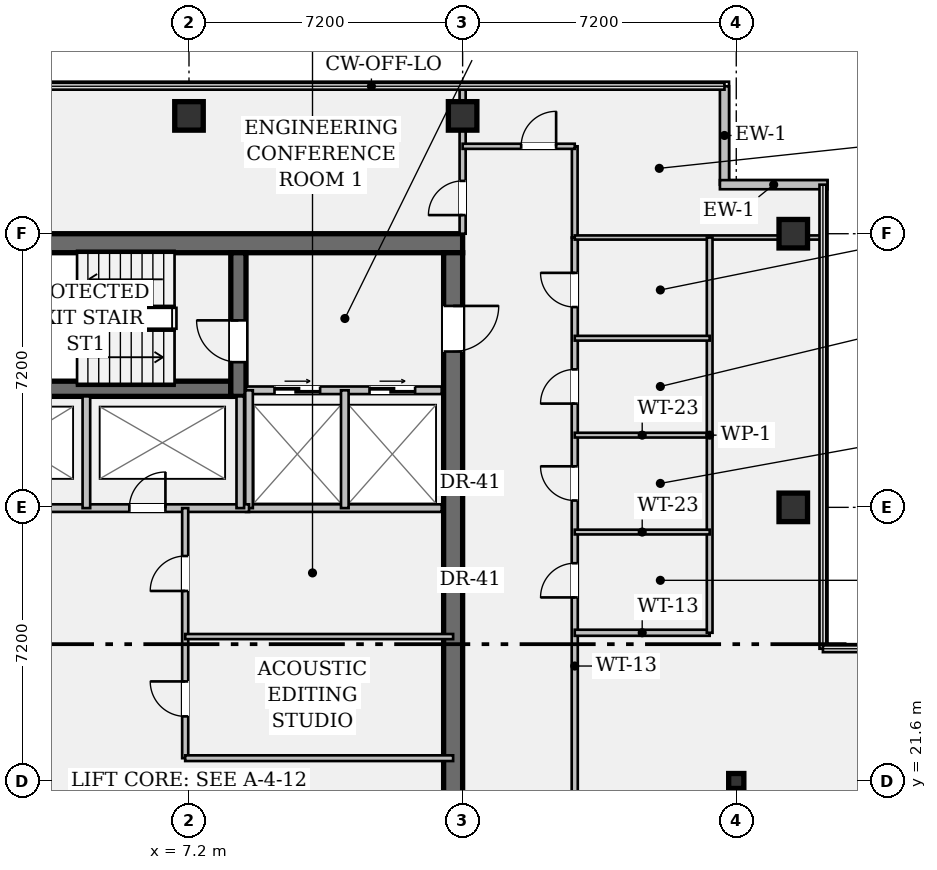
"""IFC4 building model, lengths in metres.
Left out: names, types, materials, properties, quantities, classifications, styles, units other than length and angle.
Written with IfcOpenShell. Run it as: python <this file> out.ifc"""

import sys

from ifc_helpers import new_model, si_unit, direction, frame, frame_2d, origin, origin_2d, place, context, subcontext, project, spatial, rectangle, hollow_rectangle, i_section, extrude, element, fill, save


model = new_model("IFC4")
c1 = context("Model", 3, precision=1e-05, world=origin(), true_north=direction((0.0, 1.0)))
c2 = subcontext(c1, "Body", "Model", "MODEL_VIEW")
j1 = project(units=[si_unit("LENGTHUNIT", "METRE"), si_unit("PLANEANGLEUNIT", "RADIAN")], contexts=[c1])
p1 = place(None, origin())
s1 = spatial("IfcSite", under=j1, at=p1, CompositionType="ELEMENT")
p2 = place(p1, origin())
s2 = spatial("IfcBuilding", under=s1, at=p2, CompositionType="ELEMENT")
p3 = place(p2, frame((0.0, 0.0, 201.25)))
s3 = spatial("IfcBuildingStorey", under=s2, at=p3, CompositionType="ELEMENT", Elevation=201.25)
p4 = place(p3, frame((0.5, 35.75, 0.0), z_axis=(0.0, 0.0, 1.0), x_axis=(1.0, 0.0, 0.0)))
e1 = element("IfcWall", 1, at=p4, inside=s3, PredefinedType="SHEAR", context=c2, shape_type="SweptSolid", body=[
    extrude(rectangle(XDim=13.9, YDim=0.5, at=frame_2d((6.95, 0.0))), origin(), (0.0, 0.0, 1.0), 3.24),
])
p5 = place(p3, frame((14.15, 35.5, 0.0), z_axis=(0.0, 0.0, 1.0), x_axis=(0.0, -1.0, 0.0)))
e2 = element("IfcWall", 2, at=p5, inside=s3, PredefinedType="SHEAR", context=c2, shape_type="SweptSolid", body=[
    extrude(rectangle(XDim=27.8, YDim=0.5, at=frame_2d((13.9, 0.0))), origin(), (0.0, 0.0, 1.0), 3.24),
])
p6 = place(p5, frame((1.4, 0.0, 0.0)))
e3 = element("IfcOpeningElement", 3, at=p6, cuts=e2, PredefinedType="OPENING", context=c2, shape_type="SweptSolid", body=[
    extrude(rectangle(XDim=1.2, YDim=2.15, at=frame_2d((0.6, 1.075))), frame((0.0, 0.262, 0.0), z_axis=(0.0, -1.0, 0.0), x_axis=(1.0, 0.0, 0.0)), (0.0, 0.0, 1.0), 0.524),
])
p7 = place(p5, frame((25.35, 0.0, 0.0)))
e4 = element("IfcOpeningElement", 4, at=p7, cuts=e2, PredefinedType="OPENING", context=c2, shape_type="SweptSolid", body=[
    extrude(rectangle(XDim=1.2, YDim=2.15, at=frame_2d((0.6, 1.075))), frame((0.0, 0.262, 0.0), z_axis=(0.0, -1.0, 0.0), x_axis=(1.0, 0.0, 0.0)), (0.0, 0.0, 1.0), 0.524),
])
p8 = place(p5, frame((14.7, 0.0, 0.0)))
e5 = element("IfcOpeningElement", 5, at=p8, cuts=e2, PredefinedType="OPENING", context=c2, shape_type="SweptSolid", body=[
    extrude(rectangle(XDim=1.6, YDim=2.2, at=frame_2d((0.8, 1.1))), frame((0.0, 0.262, 0.0), z_axis=(0.0, -1.0, 0.0), x_axis=(1.0, 0.0, 0.0)), (0.0, 0.0, 1.0), 0.524),
])
p9 = place(p3, frame((0.5, 31.92, 0.0), z_axis=(0.0, 0.0, 1.0), x_axis=(1.0, 0.0, 0.0)))
e6 = element("IfcWall", 6, at=p9, inside=s3, PredefinedType="SHEAR", context=c2, shape_type="SweptSolid", body=[
    extrude(rectangle(XDim=7.8, YDim=0.4, at=frame_2d((3.9, 0.0))), origin(), (0.0, 0.0, 1.0), 3.24),
])
p10 = place(p3, frame((8.5, 31.72, 0.0), z_axis=(0.0, 0.0, 1.0), x_axis=(0.0, 1.0, 0.0)))
e7 = element("IfcWall", 7, at=p10, inside=s3, PredefinedType="SHEAR", context=c2, shape_type="SweptSolid", body=[
    extrude(rectangle(XDim=3.78, YDim=0.4, at=frame_2d((1.89, 0.0))), origin(), (0.0, 0.0, 1.0), 3.24),
])
p11 = place(p10, frame((0.9, 0.0, 0.0)))
e8 = element("IfcOpeningElement", 8, at=p11, cuts=e7, PredefinedType="OPENING", context=c2, shape_type="SweptSolid", body=[
    extrude(rectangle(XDim=1.1, YDim=2.15, at=frame_2d((0.55, 1.075))), frame((0.0, 0.212, 0.0), z_axis=(0.0, -1.0, 0.0), x_axis=(1.0, 0.0, 0.0)), (0.0, 0.0, 1.0), 0.424),
])
for number, where, z_axis, x_axis in (
    (9, (7.2, 39.1, 0.0), (0.0, 0.0, 1.0), (1.0, 0.0, 0.0)),
    (10, (14.4, 39.1, 0.0), (0.0, 0.0, 1.0), (1.0, 0.0, 0.0)),
):
    element("IfcColumn", number, at=place(p3, frame(where, z_axis=z_axis, x_axis=x_axis)), inside=s3, PredefinedType="COLUMN", context=c2, shape_type="SweptSolid", body=[
        extrude(hollow_rectangle(XDim=0.75, YDim=0.75, WallThickness=0.045, at=origin_2d()), origin(), (0.0, 0.0, 1.0), 3.24),
    ])
p12 = place(p3, frame((21.6, 21.6, 0.0), z_axis=(0.0, 0.0, 1.0), x_axis=(1.0, 0.0, 0.0)))
e11 = element("IfcColumn", 11, at=p12, inside=s3, PredefinedType="COLUMN", context=c2, shape_type="SweptSolid", body=[
    extrude(i_section(OverallWidth=0.399, OverallDepth=0.394, WebThickness=0.023, FlangeThickness=0.037, FilletRadius=0.018, at=origin_2d()), origin(), (0.0, 0.0, 1.0), 3.24),
])
for number, where, z_axis, x_axis in (
    (12, (23.1, 28.8, 0.0), (0.0, 0.0, 1.0), (1.0, 0.0, 0.0)),
    (13, (23.1, 36.0, 0.0), (0.0, 0.0, 1.0), (1.0, 0.0, 0.0)),
):
    element("IfcColumn", number, at=place(p3, frame(where, z_axis=z_axis, x_axis=x_axis)), inside=s3, PredefinedType="COLUMN", context=c2, shape_type="SweptSolid", body=[
        extrude(hollow_rectangle(XDim=0.75, YDim=0.75, WallThickness=0.045, at=origin_2d()), origin(), (0.0, 0.0, 1.0), 3.24),
    ])
p13 = place(p3, frame((21.29, 39.88, 0.0), z_axis=(0.0, 0.0, 1.0), x_axis=(0.0, -1.0, 0.0)))
e14 = element("IfcWall", 14, at=p13, inside=s3, PredefinedType="STANDARD", context=c2, shape_type="SweptSolid", body=[
    extrude(rectangle(XDim=2.59, YDim=0.24, at=frame_2d((1.295, 0.0))), origin(), (0.0, 0.0, 1.0), 3.24),
])
p14 = place(p3, frame((21.17, 37.29, 0.0), z_axis=(0.0, 0.0, 1.0), x_axis=(1.0, 0.0, 0.0)))
e15 = element("IfcWall", 15, at=p14, inside=s3, PredefinedType="STANDARD", context=c2, shape_type="SweptSolid", body=[
    extrude(rectangle(XDim=2.83, YDim=0.24, at=frame_2d((1.415, 0.0))), origin(), (0.0, 0.0, 1.0), 3.24),
])
p15 = place(p3, frame((8.7, 31.88, 0.0), z_axis=(0.0, 0.0, 1.0), x_axis=(1.0, 0.0, 0.0)))
e16 = element("IfcWall", 16, at=p15, inside=s3, PredefinedType="PARTITIONING", context=c2, shape_type="SweptSolid", body=[
    extrude(rectangle(XDim=5.15, YDim=0.2, at=frame_2d((2.575, 0.0))), origin(), (0.0, 0.0, 1.0), 3.24),
])
p16 = place(p15, frame((0.75, 0.0, 0.0)))
e17 = element("IfcOpeningElement", 17, at=p16, cuts=e16, PredefinedType="OPENING", context=c2, shape_type="SweptSolid", body=[
    extrude(rectangle(XDim=1.2, YDim=2.2, at=frame_2d((0.6, 1.1))), frame((0.0, 0.112, 0.0), z_axis=(0.0, -1.0, 0.0), x_axis=(1.0, 0.0, 0.0)), (0.0, 0.0, 1.0), 0.224),
])
p17 = place(p15, frame((3.25, 0.0, 0.0)))
e18 = element("IfcOpeningElement", 18, at=p17, cuts=e16, PredefinedType="OPENING", context=c2, shape_type="SweptSolid", body=[
    extrude(rectangle(XDim=1.2, YDim=2.2, at=frame_2d((0.6, 1.1))), frame((0.0, 0.112, 0.0), z_axis=(0.0, -1.0, 0.0), x_axis=(1.0, 0.0, 0.0)), (0.0, 0.0, 1.0), 0.224),
])
p18 = place(p3, frame((8.7, 28.78, 0.0), z_axis=(0.0, 0.0, 1.0), x_axis=(1.0, 0.0, 0.0)))
e19 = element("IfcWall", 19, at=p18, inside=s3, PredefinedType="PARTITIONING", context=c2, shape_type="SweptSolid", body=[
    extrude(rectangle(XDim=5.15, YDim=0.2, at=frame_2d((2.575, 0.0))), origin(), (0.0, 0.0, 1.0), 3.24),
])
for number, where, z_axis, x_axis in (
    (20, (8.78, 28.78, 0.0), (0.0, 0.0, 1.0), (0.0, 1.0, 0.0)),
    (21, (11.3, 28.78, 0.0), (0.0, 0.0, 1.0), (0.0, 1.0, 0.0)),
):
    element("IfcWall", number, at=place(p3, frame(where, z_axis=z_axis, x_axis=x_axis)), inside=s3, PredefinedType="PARTITIONING", context=c2, shape_type="SweptSolid", body=[
        extrude(rectangle(XDim=3.1, YDim=0.2, at=frame_2d((1.55, 0.0))), origin(), (0.0, 0.0, 1.0), 3.24),
    ])
p19 = place(p3, frame((0.6, 28.78, 0.0), z_axis=(0.0, 0.0, 1.0), x_axis=(1.0, 0.0, 0.0)))
e22 = element("IfcWall", 22, at=p19, inside=s3, PredefinedType="PARTITIONING", context=c2, shape_type="SweptSolid", body=[
    extrude(rectangle(XDim=8.18, YDim=0.2, at=frame_2d((4.09, 0.0))), origin(), (0.0, 0.0, 1.0), 3.24),
])
p20 = place(p19, frame((1.21, 0.0, 0.0)))
e23 = element("IfcOpeningElement", 23, at=p20, cuts=e22, PredefinedType="OPENING", context=c2, shape_type="SweptSolid", body=[
    extrude(rectangle(XDim=0.95, YDim=2.15, at=frame_2d((0.475, 1.075))), frame((0.0, 0.112, 0.0), z_axis=(0.0, -1.0, 0.0), x_axis=(1.0, 0.0, 0.0)), (0.0, 0.0, 1.0), 0.224),
])
p21 = place(p19, frame((5.03, 0.0, 0.0)))
e24 = element("IfcOpeningElement", 24, at=p21, cuts=e22, PredefinedType="OPENING", context=c2, shape_type="SweptSolid", body=[
    extrude(rectangle(XDim=0.95, YDim=2.15, at=frame_2d((0.475, 1.075))), frame((0.0, 0.112, 0.0), z_axis=(0.0, -1.0, 0.0), x_axis=(1.0, 0.0, 0.0)), (0.0, 0.0, 1.0), 0.224),
])
for number, where, z_axis, x_axis in (
    (25, (4.5, 28.78, 0.0), (0.0, 0.0, 1.0), (0.0, 1.0, 0.0)),
    (26, (8.55, 28.78, 0.0), (0.0, 0.0, 1.0), (0.0, 1.0, 0.0)),
):
    element("IfcWall", number, at=place(p3, frame(where, z_axis=z_axis, x_axis=x_axis)), inside=s3, PredefinedType="PARTITIONING", context=c2, shape_type="SweptSolid", body=[
        extrude(rectangle(XDim=2.94, YDim=0.2, at=frame_2d((1.47, 0.0))), origin(), (0.0, 0.0, 1.0), 3.24),
    ])
p22 = place(p3, frame((7.1, 22.2, 0.0), z_axis=(0.0, 0.0, 1.0), x_axis=(0.0, 1.0, 0.0)))
e27 = element("IfcWall", 27, at=p22, inside=s3, PredefinedType="PARTITIONING", context=c2, shape_type="SweptSolid", body=[
    extrude(rectangle(XDim=6.58, YDim=0.16, at=frame_2d((3.29, 0.0))), origin(), (0.0, 0.0, 1.0), 3.24),
])
p23 = place(p22, frame((1.1, 0.0, 0.0)))
e28 = element("IfcOpeningElement", 28, at=p23, cuts=e27, PredefinedType="OPENING", context=c2, shape_type="SweptSolid", body=[
    extrude(rectangle(XDim=0.92, YDim=2.15, at=frame_2d((0.46, 1.075))), frame((0.0, 0.092, 0.0), z_axis=(0.0, -1.0, 0.0), x_axis=(1.0, 0.0, 0.0)), (0.0, 0.0, 1.0), 0.184),
])
p24 = place(p22, frame((4.4, 0.0, 0.0)))
e29 = element("IfcOpeningElement", 29, at=p24, cuts=e27, PredefinedType="OPENING", context=c2, shape_type="SweptSolid", body=[
    extrude(rectangle(XDim=0.92, YDim=2.15, at=frame_2d((0.46, 1.075))), frame((0.0, 0.092, 0.0), z_axis=(0.0, -1.0, 0.0), x_axis=(1.0, 0.0, 0.0)), (0.0, 0.0, 1.0), 0.184),
])
p25 = place(p3, frame((7.1, 22.2, 0.0), z_axis=(0.0, 0.0, 1.0), x_axis=(1.0, 0.0, 0.0)))
e30 = element("IfcWall", 30, at=p25, inside=s3, PredefinedType="PARTITIONING", context=c2, shape_type="SweptSolid", body=[
    extrude(rectangle(XDim=7.05, YDim=0.15, at=frame_2d((3.525, 0.0))), origin(), (0.0, 0.0, 1.0), 3.24),
])
p26 = place(p3, frame((7.1, 25.4, 0.0), z_axis=(0.0, 0.0, 1.0), x_axis=(1.0, 0.0, 0.0)))
e31 = element("IfcWall", 31, at=p26, inside=s3, PredefinedType="PARTITIONING", context=c2, shape_type="SweptSolid", body=[
    extrude(rectangle(XDim=7.05, YDim=0.135, at=frame_2d((3.525, 0.0))), origin(), (0.0, 0.0, 1.0), 3.24),
])
p27 = place(p3, frame((17.35, 13.35, 0.0), z_axis=(0.0, 0.0, 1.0), x_axis=(0.0, 1.0, 0.0)))
e32 = element("IfcWall", 32, at=p27, inside=s3, PredefinedType="PARTITIONING", context=c2, shape_type="SweptSolid", body=[
    extrude(rectangle(XDim=22.55, YDim=0.16, at=frame_2d((11.275, 0.0))), origin(), (0.0, 0.0, 1.0), 2.613),
])
p28 = place(p27, frame((13.08, 0.0, 0.0)))
e33 = element("IfcOpeningElement", 33, at=p28, cuts=e32, PredefinedType="OPENING", context=c2, shape_type="SweptSolid", body=[
    extrude(rectangle(XDim=0.9, YDim=2.15, at=frame_2d((0.45, 1.075))), frame((0.0, 0.092, 0.0), z_axis=(0.0, -1.0, 0.0), x_axis=(1.0, 0.0, 0.0)), (0.0, 0.0, 1.0), 0.184),
])
p29 = place(p27, frame((15.63, 0.0, 0.0)))
e34 = element("IfcOpeningElement", 34, at=p29, cuts=e32, PredefinedType="OPENING", context=c2, shape_type="SweptSolid", body=[
    extrude(rectangle(XDim=0.9, YDim=2.15, at=frame_2d((0.45, 1.075))), frame((0.0, 0.092, 0.0), z_axis=(0.0, -1.0, 0.0), x_axis=(1.0, 0.0, 0.0)), (0.0, 0.0, 1.0), 0.184),
])
p30 = place(p27, frame((18.18, 0.0, 0.0)))
e35 = element("IfcOpeningElement", 35, at=p30, cuts=e32, PredefinedType="OPENING", context=c2, shape_type="SweptSolid", body=[
    extrude(rectangle(XDim=0.9, YDim=2.15, at=frame_2d((0.45, 1.075))), frame((0.0, 0.092, 0.0), z_axis=(0.0, -1.0, 0.0), x_axis=(1.0, 0.0, 0.0)), (0.0, 0.0, 1.0), 0.184),
])
p31 = place(p27, frame((20.72, 0.0, 0.0)))
e36 = element("IfcOpeningElement", 36, at=p31, cuts=e32, PredefinedType="OPENING", context=c2, shape_type="SweptSolid", body=[
    extrude(rectangle(XDim=0.9, YDim=2.15, at=frame_2d((0.45, 1.075))), frame((0.0, 0.092, 0.0), z_axis=(0.0, -1.0, 0.0), x_axis=(1.0, 0.0, 0.0)), (0.0, 0.0, 1.0), 0.184),
])
p32 = place(p3, frame((14.4, 36.0, 0.0), z_axis=(0.0, 0.0, 1.0), x_axis=(0.0, 1.0, 0.0)))
e37 = element("IfcWall", 37, at=p32, inside=s3, PredefinedType="PARTITIONING", context=c2, shape_type="SweptSolid", body=[
    extrude(rectangle(XDim=3.88, YDim=0.16, at=frame_2d((1.94, 0.0))), origin(), (0.0, 0.0, 1.0), 2.613),
])
p33 = place(p32, frame((0.49, 0.0, 0.0)))
e38 = element("IfcOpeningElement", 38, at=p33, cuts=e37, PredefinedType="OPENING", context=c2, shape_type="SweptSolid", body=[
    extrude(rectangle(XDim=0.9, YDim=2.15, at=frame_2d((0.45, 1.075))), frame((0.0, 0.092, 0.0), z_axis=(0.0, -1.0, 0.0), x_axis=(1.0, 0.0, 0.0)), (0.0, 0.0, 1.0), 0.184),
])
p34 = place(p3, frame((17.35, 35.9, 0.0), z_axis=(0.0, 0.0, 1.0), x_axis=(0.0, 1.0, 0.0)))
e39 = element("IfcWall", 39, at=p34, inside=s3, PredefinedType="PARTITIONING", context=c2, shape_type="SweptSolid", body=[
    extrude(rectangle(XDim=2.4, YDim=0.15, at=frame_2d((1.2, 0.0))), origin(), (0.0, 0.0, 1.0), 2.613),
])
p35 = place(p3, frame((14.4, 38.3, 0.0), z_axis=(0.0, 0.0, 1.0), x_axis=(1.0, 0.0, 0.0)))
e40 = element("IfcWall", 40, at=p35, inside=s3, PredefinedType="PARTITIONING", context=c2, shape_type="SweptSolid", body=[
    extrude(rectangle(XDim=2.95, YDim=0.135, at=frame_2d((1.475, 0.0))), origin(), (0.0, 0.0, 1.0), 3.24),
])
p36 = place(p35, frame((1.54, 0.0, 0.0)))
e41 = element("IfcOpeningElement", 41, at=p36, cuts=e40, PredefinedType="OPENING", context=c2, shape_type="SweptSolid", body=[
    extrude(rectangle(XDim=0.92, YDim=2.15, at=frame_2d((0.46, 1.075))), frame((0.0, 0.08, 0.0), z_axis=(0.0, -1.0, 0.0), x_axis=(1.0, 0.0, 0.0)), (0.0, 0.0, 1.0), 0.159),
])
p37 = place(p3, frame((17.35, 35.9, 0.0), z_axis=(0.0, 0.0, 1.0), x_axis=(1.0, 0.0, 0.0)))
e42 = element("IfcWall", 42, at=p37, inside=s3, PredefinedType="PARTITIONING", context=c2, shape_type="SweptSolid", body=[
    extrude(rectangle(XDim=6.53, YDim=0.11, at=frame_2d((3.265, 0.0))), origin(), (0.0, 0.0, 1.0), 2.613),
])
p38 = place(p3, frame((17.35, 25.5, 0.0), z_axis=(0.0, 0.0, 1.0), x_axis=(1.0, 0.0, 0.0)))
e43 = element("IfcWall", 43, at=p38, inside=s3, PredefinedType="PARTITIONING", context=c2, shape_type="SweptSolid", body=[
    extrude(rectangle(XDim=3.55, YDim=0.16, at=frame_2d((1.775, 0.0))), origin(), (0.0, 0.0, 1.0), 2.808),
])
p39 = place(p3, frame((20.9, 25.5, 0.0), z_axis=(0.0, 0.0, 1.0), x_axis=(0.0, 1.0, 0.0)))
e44 = element("IfcWall", 44, at=p39, inside=s3, PredefinedType="PARTITIONING", context=c2, shape_type="SweptSolid", body=[
    extrude(rectangle(XDim=10.4, YDim=0.15, at=frame_2d((5.2, 0.0))), origin(), (0.0, 0.0, 1.0), 2.613),
])
for number, where, z_axis, x_axis in (
    (45, (17.35, 28.15, 0.0), (0.0, 0.0, 1.0), (1.0, 0.0, 0.0)),
    (46, (17.35, 30.7, 0.0), (0.0, 0.0, 1.0), (1.0, 0.0, 0.0)),
    (47, (17.35, 33.25, 0.0), (0.0, 0.0, 1.0), (1.0, 0.0, 0.0)),
):
    element("IfcWall", number, at=place(p3, frame(where, z_axis=z_axis, x_axis=x_axis)), inside=s3, PredefinedType="PARTITIONING", context=c2, shape_type="SweptSolid", body=[
        extrude(rectangle(XDim=3.55, YDim=0.125, at=frame_2d((1.775, 0.0))), origin(), (0.0, 0.0, 1.0), 2.808),
    ])
p40 = place(p11, origin())
e48 = element("IfcDoor", 48, at=p40, inside=s3, OperationType="SINGLE_SWING_RIGHT", PredefinedType="DOOR", context=c2, shape_type="SweptSolid", body=[
    extrude(rectangle(XDim=1.1, YDim=2.15, at=frame_2d((0.55, 1.075))), frame((0.0, 0.025, 0.0), z_axis=(0.0, -1.0, 0.0), x_axis=(1.0, 0.0, 0.0)), (0.0, 0.0, 1.0), 0.05),
])
fill(e8, e48)
p41 = place(p6, origin())
e49 = element("IfcDoor", 49, at=p41, inside=s3, OperationType="SINGLE_SWING_LEFT", PredefinedType="DOOR", context=c2, shape_type="SweptSolid", body=[
    extrude(rectangle(XDim=1.2, YDim=2.15, at=frame_2d((0.6, 1.075))), frame((0.0, 0.025, 0.0), z_axis=(0.0, -1.0, 0.0), x_axis=(1.0, 0.0, 0.0)), (0.0, 0.0, 1.0), 0.05),
])
fill(e3, e49)
p42 = place(p16, origin())
e50 = element("IfcDoor", 50, at=p42, inside=s3, OperationType="DOUBLE_DOOR_SLIDING", PredefinedType="DOOR", context=c2, shape_type="SweptSolid", body=[
    extrude(rectangle(XDim=1.2, YDim=2.2, at=frame_2d((0.6, 1.1))), frame((0.0, 0.025, 0.0), z_axis=(0.0, -1.0, 0.0), x_axis=(1.0, 0.0, 0.0)), (0.0, 0.0, 1.0), 0.05),
])
fill(e17, e50)
p43 = place(p17, origin())
e51 = element("IfcDoor", 51, at=p43, inside=s3, OperationType="DOUBLE_DOOR_SLIDING", PredefinedType="DOOR", context=c2, shape_type="SweptSolid", body=[
    extrude(rectangle(XDim=1.2, YDim=2.2, at=frame_2d((0.6, 1.1))), frame((0.0, 0.025, 0.0), z_axis=(0.0, -1.0, 0.0), x_axis=(1.0, 0.0, 0.0)), (0.0, 0.0, 1.0), 0.05),
])
fill(e18, e51)
p44 = place(p21, origin())
e52 = element("IfcDoor", 52, at=p44, inside=s3, OperationType="SINGLE_SWING_RIGHT", PredefinedType="DOOR", context=c2, shape_type="SweptSolid", body=[
    extrude(rectangle(XDim=0.95, YDim=2.15, at=frame_2d((0.475, 1.075))), frame((0.0, 0.025, 0.0), z_axis=(0.0, -1.0, 0.0), x_axis=(1.0, 0.0, 0.0)), (0.0, 0.0, 1.0), 0.05),
])
fill(e24, e52)
p45 = place(p23, origin())
e53 = element("IfcDoor", 53, at=p45, inside=s3, OperationType="SINGLE_SWING_RIGHT", PredefinedType="DOOR", context=c2, shape_type="SweptSolid", body=[
    extrude(rectangle(XDim=0.92, YDim=2.15, at=frame_2d((0.46, 1.075))), frame((0.0, 0.025, 0.0), z_axis=(0.0, -1.0, 0.0), x_axis=(1.0, 0.0, 0.0)), (0.0, 0.0, 1.0), 0.05),
])
fill(e28, e53)
p46 = place(p24, origin())
e54 = element("IfcDoor", 54, at=p46, inside=s3, OperationType="SINGLE_SWING_LEFT", PredefinedType="DOOR", context=c2, shape_type="SweptSolid", body=[
    extrude(rectangle(XDim=0.92, YDim=2.15, at=frame_2d((0.46, 1.075))), frame((0.0, 0.025, 0.0), z_axis=(0.0, -1.0, 0.0), x_axis=(1.0, 0.0, 0.0)), (0.0, 0.0, 1.0), 0.05),
])
fill(e29, e54)
p47 = place(p33, origin())
e55 = element("IfcDoor", 55, at=p47, inside=s3, OperationType="SINGLE_SWING_LEFT", PredefinedType="DOOR", context=c2, shape_type="SweptSolid", body=[
    extrude(rectangle(XDim=0.9, YDim=2.15, at=frame_2d((0.45, 1.075))), frame((0.0, 0.025, 0.0), z_axis=(0.0, -1.0, 0.0), x_axis=(1.0, 0.0, 0.0)), (0.0, 0.0, 1.0), 0.05),
])
fill(e38, e55)
p48 = place(p36, origin())
e56 = element("IfcDoor", 56, at=p48, inside=s3, OperationType="SINGLE_SWING_RIGHT", PredefinedType="DOOR", context=c2, shape_type="SweptSolid", body=[
    extrude(rectangle(XDim=0.92, YDim=2.15, at=frame_2d((0.46, 1.075))), frame((0.0, 0.025, 0.0), z_axis=(0.0, -1.0, 0.0), x_axis=(1.0, 0.0, 0.0)), (0.0, 0.0, 1.0), 0.05),
])
fill(e41, e56)
p49 = place(p28, origin())
e57 = element("IfcDoor", 57, at=p49, inside=s3, OperationType="SINGLE_SWING_LEFT", PredefinedType="DOOR", context=c2, shape_type="SweptSolid", body=[
    extrude(rectangle(XDim=0.9, YDim=2.15, at=frame_2d((0.45, 1.075))), frame((0.0, 0.025, 0.0), z_axis=(0.0, -1.0, 0.0), x_axis=(1.0, 0.0, 0.0)), (0.0, 0.0, 1.0), 0.05),
])
fill(e33, e57)
p50 = place(p29, origin())
e58 = element("IfcDoor", 58, at=p50, inside=s3, OperationType="SINGLE_SWING_RIGHT", PredefinedType="DOOR", context=c2, shape_type="SweptSolid", body=[
    extrude(rectangle(XDim=0.9, YDim=2.15, at=frame_2d((0.45, 1.075))), frame((0.0, 0.025, 0.0), z_axis=(0.0, -1.0, 0.0), x_axis=(1.0, 0.0, 0.0)), (0.0, 0.0, 1.0), 0.05),
])
fill(e34, e58)
p51 = place(p30, origin())
e59 = element("IfcDoor", 59, at=p51, inside=s3, OperationType="SINGLE_SWING_LEFT", PredefinedType="DOOR", context=c2, shape_type="SweptSolid", body=[
    extrude(rectangle(XDim=0.9, YDim=2.15, at=frame_2d((0.45, 1.075))), frame((0.0, 0.025, 0.0), z_axis=(0.0, -1.0, 0.0), x_axis=(1.0, 0.0, 0.0)), (0.0, 0.0, 1.0), 0.05),
])
fill(e35, e59)
p52 = place(p31, origin())
e60 = element("IfcDoor", 60, at=p52, inside=s3, OperationType="SINGLE_SWING_RIGHT", PredefinedType="DOOR", context=c2, shape_type="SweptSolid", body=[
    extrude(rectangle(XDim=0.9, YDim=2.15, at=frame_2d((0.45, 1.075))), frame((0.0, 0.025, 0.0), z_axis=(0.0, -1.0, 0.0), x_axis=(1.0, 0.0, 0.0)), (0.0, 0.0, 1.0), 0.05),
])
fill(e36, e60)
save(model, sys.argv[1])
